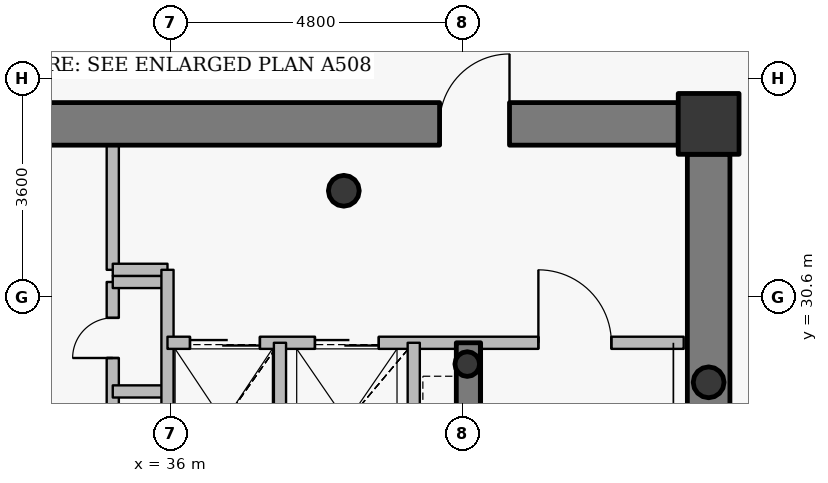
"""IFC4 building model, lengths in metres.
Left out: names, types, materials, properties, quantities, classifications, styles, units other than length and angle.
Written with IfcOpenShell. Run it as: python <this file> out.ifc"""

import sys

from ifc_helpers import new_model, si_unit, direction, frame, frame_2d, origin, origin_2d, place, context, subcontext, project, spatial, rectangle, hollow_circle, extrude, source, transform, mapped, element, fill, save


model = new_model("IFC4")
c1 = context("Model", 3, precision=1e-05, world=origin(), true_north=direction((0.0, 1.0)))
c2 = subcontext(c1, "Body", "Model", "MODEL_VIEW")
j1 = project(units=[si_unit("LENGTHUNIT", "METRE"), si_unit("PLANEANGLEUNIT", "RADIAN")], contexts=[c1])
p1 = place(None, origin())
s1 = spatial("IfcSite", under=j1, at=p1, CompositionType="ELEMENT")
p2 = place(p1, origin())
s2 = spatial("IfcBuilding", under=s1, at=p2, CompositionType="ELEMENT")
p3 = place(p2, frame((0.0, 0.0, 284.25)))
s3 = spatial("IfcBuildingStorey", under=s2, at=p3, CompositionType="ELEMENT", Elevation=284.25)
p4 = place(p3, frame((44.85, 33.45, 0.0), z_axis=(0.0, 0.0, 1.0), x_axis=(1.0, 0.0, 0.0)))
e1 = element("IfcColumn", 1, at=p4, inside=s3, PredefinedType="COLUMN", context=c2, shape_type="SweptSolid", body=[
    extrude(rectangle(XDim=1.0, YDim=1.0, at=origin_2d()), origin(), (0.0, 0.0, 1.0), 3.75),
])
p5 = place(p3, frame((38.85, 32.35, 0.0), z_axis=(0.0, 0.0, 1.0), x_axis=(1.0, 0.0, 0.0)))
e2 = element("IfcColumn", 2, at=p5, inside=s3, PredefinedType="COLUMN", context=c2, shape_type="SweptSolid", body=[
    extrude(hollow_circle(Radius=0.254, WallThickness=0.02, at=origin_2d()), origin(), (0.0, 0.0, 1.0), 3.75),
])
p6 = place(p3, frame((40.88, 29.5, 0.0), z_axis=(0.0, 0.0, 1.0), x_axis=(1.0, 0.0, 0.0)))
e3 = element("IfcColumn", 3, at=p6, inside=s3, PredefinedType="COLUMN", context=c2, shape_type="SweptSolid", body=[
    extrude(hollow_circle(Radius=0.203, WallThickness=0.016, at=origin_2d()), origin(), (0.0, 0.0, 1.0), 3.75),
])
p7 = place(p3, frame((27.65, 33.45, 0.0), z_axis=(0.0, 0.0, 1.0), x_axis=(1.0, 0.0, 0.0)))
e4 = element("IfcWall", 4, at=p7, inside=s3, PredefinedType="SHEAR", context=c2, shape_type="SweptSolid", body=[
    extrude(rectangle(XDim=16.7, YDim=0.7, at=frame_2d((8.35, 0.0))), origin(), (0.0, 0.0, 1.0), 3.05),
])
p8 = place(p7, frame((12.775, 0.0, 0.0)))
e5 = element("IfcOpeningElement", 5, at=p8, cuts=e4, PredefinedType="OPENING", context=c2, shape_type="SweptSolid", body=[
    extrude(rectangle(XDim=1.15, YDim=2.15, at=origin_2d()), frame((0.575, 0.36, 1.075), z_axis=(0.0, -1.0, 0.0), x_axis=(1.0, 0.0, 0.0)), (0.0, 0.0, 1.0), 0.72),
])
p9 = place(p3, frame((44.85, 32.95, 0.0), z_axis=(0.0, 0.0, 1.0), x_axis=(0.0, -1.0, 0.0)))
e6 = element("IfcWall", 6, at=p9, inside=s3, PredefinedType="SHEAR", context=c2, shape_type="SweptSolid", body=[
    extrude(rectangle(XDim=11.9, YDim=0.7, at=frame_2d((5.95, 0.0))), origin(), (0.0, 0.0, 1.0), 3.05),
])
p10 = place(p3, frame((40.9, 27.25, 0.0), z_axis=(0.0, 0.0, 1.0), x_axis=(0.0, 1.0, 0.0)))
e7 = element("IfcWall", 7, at=p10, inside=s3, PredefinedType="SHEAR", context=c2, shape_type="SweptSolid", body=[
    extrude(rectangle(XDim=2.6, YDim=0.4, at=frame_2d((1.3, 0.0))), origin(), (0.0, 0.0, 1.0), 3.1),
])
p11 = place(p3, frame((44.85, 29.2, 0.0), z_axis=(0.0, 0.0, 1.0), x_axis=(1.0, 0.0, 0.0)))
e8 = element("IfcColumn", 8, at=p11, inside=s3, PredefinedType="COLUMN", context=c2, shape_type="SweptSolid", body=[
    extrude(hollow_circle(Radius=0.254, WallThickness=0.02, at=origin_2d()), origin(), (0.0, 0.0, 1.0), 3.75),
])
p12 = place(p3, frame((35.05, 27.25, 0.0), z_axis=(0.0, 0.0, 1.0), x_axis=(0.0, 1.0, 0.0)))
e9 = element("IfcWall", 9, at=p12, inside=s3, PredefinedType="PARTITIONING", context=c2, shape_type="SweptSolid", body=[
    extrude(rectangle(XDim=3.6, YDim=0.2, at=frame_2d((1.8, 0.0))), origin(), (0.0, 0.0, 1.0), 3.5),
])
p13 = place(p12, frame((0.59, 0.0, 0.0)))
e10 = element("IfcOpeningElement", 10, at=p13, cuts=e9, PredefinedType="OPENING", context=c2, shape_type="SweptSolid", body=[
    extrude(rectangle(XDim=0.66, YDim=2.05, at=origin_2d()), frame((0.33, 0.11, 1.025), z_axis=(0.0, -1.0, 0.0), x_axis=(1.0, 0.0, 0.0)), (0.0, 0.0, 1.0), 0.22),
])
p14 = place(p12, frame((2.35, 0.0, 0.0)))
e11 = element("IfcOpeningElement", 11, at=p14, cuts=e9, PredefinedType="OPENING", context=c2, shape_type="SweptSolid", body=[
    extrude(rectangle(XDim=0.66, YDim=2.05, at=origin_2d()), frame((0.33, 0.11, 1.025), z_axis=(0.0, -1.0, 0.0), x_axis=(1.0, 0.0, 0.0)), (0.0, 0.0, 1.0), 0.22),
])
for number, where, z_axis, x_axis in (
    (12, (35.05, 29.05, 0.0), (0.0, 0.0, 1.0), (1.0, 0.0, 0.0)),
    (13, (35.05, 30.85, 0.0), (0.0, 0.0, 1.0), (1.0, 0.0, 0.0)),
):
    element("IfcWall", number, at=place(p3, frame(where, z_axis=z_axis, x_axis=x_axis)), inside=s3, PredefinedType="PARTITIONING", context=c2, shape_type="SweptSolid", body=[
        extrude(rectangle(XDim=0.9, YDim=0.2, at=frame_2d((0.45, 0.0))), origin(), (0.0, 0.0, 1.0), 3.5),
    ])
p15 = place(p3, frame((35.05, 31.05, 0.0), z_axis=(0.0, 0.0, 1.0), x_axis=(0.0, 1.0, 0.0)))
e14 = element("IfcWall", 14, at=p15, inside=s3, PredefinedType="PARTITIONING", context=c2, shape_type="SweptSolid", body=[
    extrude(rectangle(XDim=2.05, YDim=0.2, at=frame_2d((1.025, 0.0))), origin(), (0.0, 0.0, 1.0), 3.085),
])
p16 = place(p3, frame((35.05, 31.05, 0.0), z_axis=(0.0, 0.0, 1.0), x_axis=(1.0, 0.0, 0.0)))
e15 = element("IfcWall", 15, at=p16, inside=s3, PredefinedType="PARTITIONING", context=c2, shape_type="SweptSolid", body=[
    extrude(rectangle(XDim=0.9, YDim=0.2, at=frame_2d((0.45, 0.0))), origin(), (0.0, 0.0, 1.0), 3.5),
])
p17 = place(p3, frame((35.95, 27.25, 0.0), z_axis=(0.0, 0.0, 1.0), x_axis=(0.0, 1.0, 0.0)))
e16 = element("IfcWall", 16, at=p17, inside=s3, PredefinedType="PARTITIONING", context=c2, shape_type="SweptSolid", body=[
    extrude(rectangle(XDim=3.8, YDim=0.2, at=frame_2d((1.9, 0.0))), origin(), (0.0, 0.0, 1.0), 3.5),
])
p18 = place(p3, frame((35.95, 29.85, 0.0), z_axis=(0.0, 0.0, 1.0), x_axis=(1.0, 0.0, 0.0)))
e17 = element("IfcWall", 17, at=p18, inside=s3, PredefinedType="PARTITIONING", context=c2, shape_type="SweptSolid", body=[
    extrude(rectangle(XDim=8.49, YDim=0.2, at=frame_2d((4.245, 0.0))), origin(), (0.0, 0.0, 1.0), 3.085),
])
p19 = place(p18, frame((6.1, 0.0, 0.0)))
e18 = element("IfcOpeningElement", 18, at=p19, cuts=e17, PredefinedType="OPENING", context=c2, shape_type="SweptSolid", body=[
    extrude(rectangle(XDim=1.2, YDim=2.15, at=origin_2d()), frame((0.6, 0.11, 1.075), z_axis=(0.0, -1.0, 0.0), x_axis=(1.0, 0.0, 0.0)), (0.0, 0.0, 1.0), 0.22),
])
p20 = place(p18, frame((0.37, 0.0, 0.0)))
e19 = element("IfcOpeningElement", 19, at=p20, cuts=e17, PredefinedType="OPENING", context=c2, shape_type="SweptSolid", body=[
    extrude(rectangle(XDim=1.15, YDim=2.15, at=origin_2d()), frame((0.575, 0.11, 1.075), z_axis=(0.0, -1.0, 0.0), x_axis=(1.0, 0.0, 0.0)), (0.0, 0.0, 1.0), 0.22),
])
p21 = place(p18, frame((2.425, 0.0, 0.0)))
e20 = element("IfcOpeningElement", 20, at=p21, cuts=e17, PredefinedType="OPENING", context=c2, shape_type="SweptSolid", body=[
    extrude(rectangle(XDim=1.05, YDim=2.15, at=origin_2d()), frame((0.525, 0.11, 1.075), z_axis=(0.0, -1.0, 0.0), x_axis=(1.0, 0.0, 0.0)), (0.0, 0.0, 1.0), 0.22),
])
p22 = place(p3, frame((37.8, 27.25, 0.0), z_axis=(0.0, 0.0, 1.0), x_axis=(0.0, 1.0, 0.0)))
e21 = element("IfcWall", 21, at=p22, inside=s3, PredefinedType="PARTITIONING", context=c2, shape_type="SweptSolid", body=[
    extrude(rectangle(XDim=2.6, YDim=0.2, at=frame_2d((1.3, 0.0))), origin(), (0.0, 0.0, 1.0), 3.5),
])
p23 = place(p3, frame((40.0, 25.45, 0.0), z_axis=(0.0, 0.0, 1.0), x_axis=(0.0, 1.0, 0.0)))
e22 = element("IfcWall", 22, at=p23, inside=s3, PredefinedType="PARTITIONING", context=c2, shape_type="SweptSolid", body=[
    extrude(rectangle(XDim=4.4, YDim=0.2, at=frame_2d((2.2, 0.0))), origin(), (0.0, 0.0, 1.0), 3.5),
])
p24 = place(p3, frame((45.2, 33.8, 0.0), z_axis=(0.0, 0.0, 1.0), x_axis=(-1.0, 0.0, 0.0)))
e23 = element("IfcWall", 23, at=p24, inside=s3, PredefinedType="PARTITIONING", context=c2, shape_type="SweptSolid", body=[
    extrude(rectangle(XDim=0.84, YDim=0.135, at=frame_2d((0.42, 0.0))), origin(), (0.0, 0.0, 1.0), 3.035),
])
p25 = place(p3, frame((45.2, 32.96, 0.0), z_axis=(0.0, 0.0, 1.0), x_axis=(0.0, 1.0, 0.0)))
e24 = element("IfcWall", 24, at=p25, inside=s3, PredefinedType="PARTITIONING", context=c2, shape_type="SweptSolid", body=[
    extrude(rectangle(XDim=0.532, YDim=0.135, at=frame_2d((0.266, 0.0))), origin(), (0.0, 0.0, 1.0), 3.5),
])
m1 = source(origin(), c2, "Body", "SweptSolid", [
    extrude(rectangle(XDim=1.15, YDim=2.15, at=origin_2d()), frame((0.575, 0.025, 1.075), z_axis=(0.0, -1.0, 0.0), x_axis=(1.0, 0.0, 0.0)), (0.0, 0.0, 1.0), 0.05),
])
p26 = place(p8, origin())
e25 = element("IfcDoor", 25, at=p26, inside=s3, OperationType="SINGLE_SWING_RIGHT", PredefinedType="DOOR", context=c2, shape_type="MappedRepresentation", body=[
    mapped(m1, transform((0.0, 0.0, 0.0), x_axis=(1.0, 0.0, 0.0), y_axis=(0.0, 1.0, 0.0), z_axis=(0.0, 0.0, 1.0), scale=1.0)),
])
fill(e5, e25)
m2 = source(origin(), c2, "Body", "SweptSolid", [
    extrude(rectangle(XDim=1.2, YDim=2.15, at=origin_2d()), frame((0.6, 0.025, 1.075), z_axis=(0.0, -1.0, 0.0), x_axis=(1.0, 0.0, 0.0)), (0.0, 0.0, 1.0), 0.05),
])
p27 = place(p19, origin())
e26 = element("IfcDoor", 26, at=p27, inside=s3, OperationType="SINGLE_SWING_LEFT", PredefinedType="DOOR", context=c2, shape_type="MappedRepresentation", body=[
    mapped(m2, transform((0.0, 0.0, 0.0), x_axis=(1.0, 0.0, 0.0), y_axis=(0.0, 1.0, 0.0), z_axis=(0.0, 0.0, 1.0), scale=1.0)),
])
fill(e18, e26)
m3 = source(origin(), c2, "Body", "SweptSolid", [
    extrude(rectangle(XDim=1.15, YDim=2.15, at=origin_2d()), frame((0.575, 0.025, 1.075), z_axis=(0.0, -1.0, 0.0), x_axis=(1.0, 0.0, 0.0)), (0.0, 0.0, 1.0), 0.05),
])
p28 = place(p20, origin())
e27 = element("IfcDoor", 27, at=p28, inside=s3, OperationType="DOUBLE_DOOR_SLIDING", PredefinedType="USERDEFINED", context=c2, shape_type="MappedRepresentation", body=[
    mapped(m3, transform((0.0, 0.0, 0.0), x_axis=(1.0, 0.0, 0.0), y_axis=(0.0, 1.0, 0.0), z_axis=(0.0, 0.0, 1.0), scale=1.0)),
])
fill(e19, e27)
m4 = source(origin(), c2, "Body", "SweptSolid", [
    extrude(rectangle(XDim=1.05, YDim=2.15, at=origin_2d()), frame((0.525, 0.025, 1.075), z_axis=(0.0, -1.0, 0.0), x_axis=(1.0, 0.0, 0.0)), (0.0, 0.0, 1.0), 0.05),
])
p29 = place(p21, origin())
e28 = element("IfcDoor", 28, at=p29, inside=s3, OperationType="DOUBLE_DOOR_SLIDING", PredefinedType="USERDEFINED", context=c2, shape_type="MappedRepresentation", body=[
    mapped(m4, transform((0.0, 0.0, 0.0), x_axis=(1.0, 0.0, 0.0), y_axis=(0.0, 1.0, 0.0), z_axis=(0.0, 0.0, 1.0), scale=1.0)),
])
fill(e20, e28)
m5 = source(origin(), c2, "Body", "SweptSolid", [
    extrude(rectangle(XDim=0.66, YDim=2.05, at=origin_2d()), frame((0.33, 0.025, 1.025), z_axis=(0.0, -1.0, 0.0), x_axis=(1.0, 0.0, 0.0)), (0.0, 0.0, 1.0), 0.05),
])
p30 = place(p14, origin())
e29 = element("IfcDoor", 29, at=p30, inside=s3, OperationType="SINGLE_SWING_LEFT", PredefinedType="USERDEFINED", context=c2, shape_type="MappedRepresentation", body=[
    mapped(m5, transform((0.0, 0.0, 0.0), x_axis=(1.0, 0.0, 0.0), y_axis=(0.0, 1.0, 0.0), z_axis=(0.0, 0.0, 1.0), scale=1.0)),
])
fill(e11, e29)
save(model, sys.argv[1])
